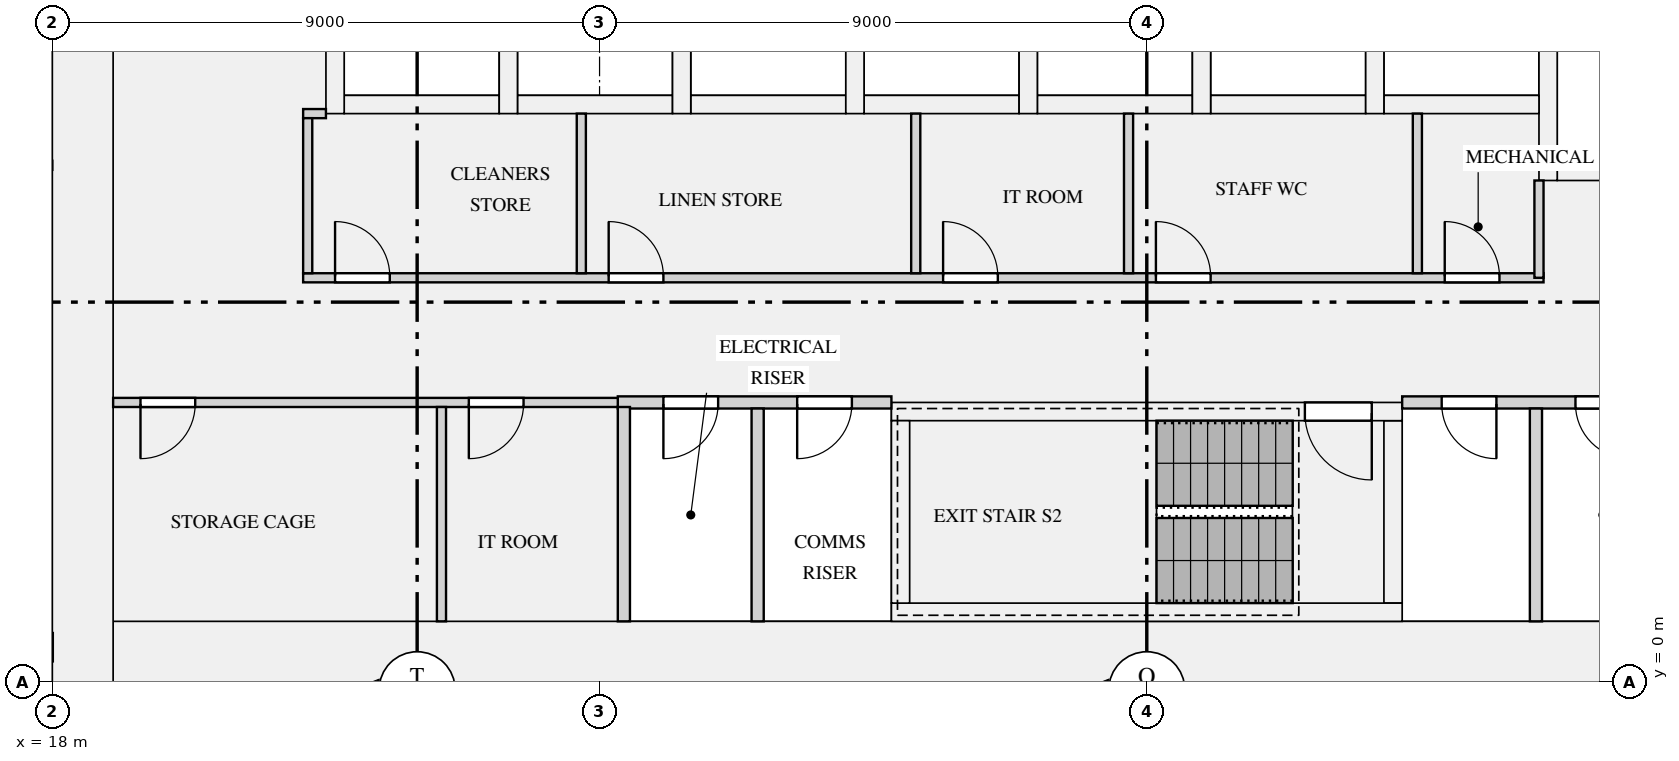
"""IFC4 building model, lengths in metres.
Left out: names, types, materials, properties, quantities, classifications, styles, units other than length and angle.
Written with IfcOpenShell. Run it as: python <this file> out.ifc"""

import sys

from ifc_helpers import new_model, si_unit, direction, frame, frame_2d, origin, place, context, subcontext, project, spatial, rectangle, extrude, element, fill, save


model = new_model("IFC4")
c1 = context("Model", 3, precision=1e-05, world=origin(), true_north=direction((0.0, 1.0)))
c2 = subcontext(c1, "Body", "Model", "MODEL_VIEW")
j1 = project(units=[si_unit("LENGTHUNIT", "METRE"), si_unit("PLANEANGLEUNIT", "RADIAN")], contexts=[c1])
p1 = place(None, origin())
s1 = spatial("IfcSite", under=j1, at=p1, CompositionType="ELEMENT")
p2 = place(p1, origin())
s2 = spatial("IfcBuilding", under=s1, at=p2, CompositionType="ELEMENT")
p3 = place(p2, frame((0.0, 0.0, 66.75)))
s3 = spatial("IfcBuildingStorey", under=s2, at=p3, CompositionType="ELEMENT", Elevation=66.75)
p4 = place(p3, frame((18.5, 0.0, 0.0), z_axis=(0.0, 0.0, 1.0), x_axis=(0.0, 1.0, 0.0)))
e1 = element("IfcWall", 1, at=p4, inside=s3, PredefinedType="SHEAR", context=c2, shape_type="SweptSolid", body=[
    extrude(rectangle(XDim=12.5, YDim=1.0, at=frame_2d((6.25, 0.0))), origin(), (0.0, 0.0, 1.0), 3.15),
])
p5 = place(p3, frame((19.0, 0.5, 0.0), z_axis=(0.0, 0.0, 1.0), x_axis=(1.0, 0.0, 0.0)))
e2 = element("IfcWall", 2, at=p5, inside=s3, PredefinedType="SHEAR", context=c2, shape_type="SweptSolid", body=[
    extrude(rectangle(XDim=34.0, YDim=1.0, at=frame_2d((17.0, 0.0))), origin(), (0.0, 0.0, 1.0), 3.15),
])
p6 = place(p3, frame((22.8, 9.5, 0.0), z_axis=(0.0, 0.0, 1.0), x_axis=(1.0, 0.0, 0.0)))
e3 = element("IfcWall", 3, at=p6, inside=s3, PredefinedType="SHEAR", context=c2, shape_type="SweptSolid", body=[
    extrude(rectangle(XDim=2.55, YDim=0.3, at=frame_2d((1.275, 0.0))), origin(), (0.0, 0.0, 1.0), 3.15),
])
p7 = place(p3, frame((22.65, 9.35, 0.0), z_axis=(0.0, 0.0, 1.0), x_axis=(0.0, 1.0, 0.0)))
e4 = element("IfcWall", 4, at=p7, inside=s3, PredefinedType="SHEAR", context=c2, shape_type="SweptSolid", body=[
    extrude(rectangle(XDim=2.55, YDim=0.3, at=frame_2d((1.275, 0.0))), origin(), (0.0, 0.0, 1.0), 3.15),
])
p8 = place(p3, frame((25.65, 9.5, 0.0), z_axis=(0.0, 0.0, 1.0), x_axis=(1.0, 0.0, 0.0)))
e5 = element("IfcWall", 5, at=p8, inside=s3, PredefinedType="SHEAR", context=c2, shape_type="SweptSolid", body=[
    extrude(rectangle(XDim=2.55, YDim=0.3, at=frame_2d((1.275, 0.0))), origin(), (0.0, 0.0, 1.0), 3.15),
])
p9 = place(p3, frame((25.5, 9.35, 0.0), z_axis=(0.0, 0.0, 1.0), x_axis=(0.0, 1.0, 0.0)))
e6 = element("IfcWall", 6, at=p9, inside=s3, PredefinedType="SHEAR", context=c2, shape_type="SweptSolid", body=[
    extrude(rectangle(XDim=2.55, YDim=0.3, at=frame_2d((1.275, 0.0))), origin(), (0.0, 0.0, 1.0), 3.15),
])
p10 = place(p3, frame((28.5, 9.5, 0.0), z_axis=(0.0, 0.0, 1.0), x_axis=(1.0, 0.0, 0.0)))
e7 = element("IfcWall", 7, at=p10, inside=s3, PredefinedType="SHEAR", context=c2, shape_type="SweptSolid", body=[
    extrude(rectangle(XDim=2.55, YDim=0.3, at=frame_2d((1.275, 0.0))), origin(), (0.0, 0.0, 1.0), 3.15),
])
for number, where, z_axis, x_axis in (
    (8, (28.35, 9.35, 0.0), (0.0, 0.0, 1.0), (0.0, 1.0, 0.0)),
    (9, (31.35, 9.5, 0.0), (0.0, 0.0, 1.0), (1.0, 0.0, 0.0)),
    (10, (31.2, 9.35, 0.0), (0.0, 0.0, 1.0), (0.0, 1.0, 0.0)),
):
    element("IfcWall", number, at=place(p3, frame(where, z_axis=z_axis, x_axis=x_axis)), inside=s3, PredefinedType="SHEAR", context=c2, shape_type="SweptSolid", body=[
        extrude(rectangle(XDim=2.55, YDim=0.3, at=frame_2d((1.275, 0.0))), origin(), (0.0, 0.0, 1.0), 3.15),
    ])
p11 = place(p3, frame((34.2, 9.5, 0.0), z_axis=(0.0, 0.0, 1.0), x_axis=(1.0, 0.0, 0.0)))
e11 = element("IfcWall", 11, at=p11, inside=s3, PredefinedType="SHEAR", context=c2, shape_type="SweptSolid", body=[
    extrude(rectangle(XDim=2.55, YDim=0.3, at=frame_2d((1.275, 0.0))), origin(), (0.0, 0.0, 1.0), 3.15),
])
p12 = place(p3, frame((34.05, 9.35, 0.0), z_axis=(0.0, 0.0, 1.0), x_axis=(0.0, 1.0, 0.0)))
e12 = element("IfcWall", 12, at=p12, inside=s3, PredefinedType="SHEAR", context=c2, shape_type="SweptSolid", body=[
    extrude(rectangle(XDim=2.55, YDim=0.3, at=frame_2d((1.275, 0.0))), origin(), (0.0, 0.0, 1.0), 3.15),
])
p13 = place(p3, frame((37.05, 9.5, 0.0), z_axis=(0.0, 0.0, 1.0), x_axis=(1.0, 0.0, 0.0)))
e13 = element("IfcWall", 13, at=p13, inside=s3, PredefinedType="SHEAR", context=c2, shape_type="SweptSolid", body=[
    extrude(rectangle(XDim=2.55, YDim=0.3, at=frame_2d((1.275, 0.0))), origin(), (0.0, 0.0, 1.0), 3.15),
])
p14 = place(p3, frame((36.9, 9.35, 0.0), z_axis=(0.0, 0.0, 1.0), x_axis=(0.0, 1.0, 0.0)))
e14 = element("IfcWall", 14, at=p14, inside=s3, PredefinedType="SHEAR", context=c2, shape_type="SweptSolid", body=[
    extrude(rectangle(XDim=2.55, YDim=0.3, at=frame_2d((1.275, 0.0))), origin(), (0.0, 0.0, 1.0), 3.15),
])
p15 = place(p3, frame((39.9, 9.5, 0.0), z_axis=(0.0, 0.0, 1.0), x_axis=(1.0, 0.0, 0.0)))
e15 = element("IfcWall", 15, at=p15, inside=s3, PredefinedType="SHEAR", context=c2, shape_type="SweptSolid", body=[
    extrude(rectangle(XDim=2.55, YDim=0.3, at=frame_2d((1.275, 0.0))), origin(), (0.0, 0.0, 1.0), 3.15),
])
p16 = place(p3, frame((39.75, 9.35, 0.0), z_axis=(0.0, 0.0, 1.0), x_axis=(0.0, 1.0, 0.0)))
e16 = element("IfcWall", 16, at=p16, inside=s3, PredefinedType="SHEAR", context=c2, shape_type="SweptSolid", body=[
    extrude(rectangle(XDim=2.55, YDim=0.3, at=frame_2d((1.275, 0.0))), origin(), (0.0, 0.0, 1.0), 3.15),
])
p17 = place(p3, frame((42.75, 8.4, 0.0), z_axis=(0.0, 0.0, 1.0), x_axis=(1.0, 0.0, 0.0)))
e17 = element("IfcWall", 17, at=p17, inside=s3, PredefinedType="SHEAR", context=c2, shape_type="SweptSolid", body=[
    extrude(rectangle(XDim=1.95, YDim=0.3, at=frame_2d((0.975, 0.0))), origin(), (0.0, 0.0, 1.0), 3.15),
])
p18 = place(p3, frame((42.6, 8.25, 0.0), z_axis=(0.0, 0.0, 1.0), x_axis=(0.0, 1.0, 0.0)))
e18 = element("IfcWall", 18, at=p18, inside=s3, PredefinedType="SHEAR", context=c2, shape_type="SweptSolid", body=[
    extrude(rectangle(XDim=3.65, YDim=0.3, at=frame_2d((1.825, 0.0))), origin(), (0.0, 0.0, 1.0), 3.15),
])
p19 = place(p3, frame((31.8, 1.15, 0.0), z_axis=(0.0, 0.0, 1.0), x_axis=(1.0, 0.0, 0.0)))
e19 = element("IfcWall", 19, at=p19, inside=s3, PredefinedType="SHEAR", context=c2, shape_type="SweptSolid", body=[
    extrude(rectangle(XDim=8.4, YDim=0.3, at=frame_2d((4.2, 0.0))), origin(), (0.0, 0.0, 1.0), 3.15),
])
p20 = place(p3, frame((31.8, 4.45, 0.0), z_axis=(0.0, 0.0, 1.0), x_axis=(1.0, 0.0, 0.0)))
e20 = element("IfcWall", 20, at=p20, inside=s3, PredefinedType="SHEAR", context=c2, shape_type="SweptSolid", body=[
    extrude(rectangle(XDim=8.4, YDim=0.3, at=frame_2d((4.2, 0.0))), origin(), (0.0, 0.0, 1.0), 3.15),
])
p21 = place(p20, frame((6.8, 0.0, 0.0)))
e21 = element("IfcOpeningElement", 21, at=p21, cuts=e20, PredefinedType="OPENING", context=c2, shape_type="SweptSolid", body=[
    extrude(rectangle(XDim=1.1, YDim=2.1, at=frame_2d((0.55, 1.05))), frame((0.0, 0.16, 0.0), z_axis=(0.0, -1.0, 0.0), x_axis=(1.0, 0.0, 0.0)), (0.0, 0.0, 1.0), 0.32),
])
for number, where, z_axis, x_axis in (
    (22, (31.95, 1.3, 0.0), (0.0, 0.0, 1.0), (0.0, 1.0, 0.0)),
    (23, (40.05, 1.3, 0.0), (0.0, 0.0, 1.0), (0.0, 1.0, 0.0)),
):
    element("IfcWall", number, at=place(p3, frame(where, z_axis=z_axis, x_axis=x_axis)), inside=s3, PredefinedType="SHEAR", context=c2, shape_type="SweptSolid", body=[
        extrude(rectangle(XDim=3.0, YDim=0.3, at=frame_2d((1.5, 0.0))), origin(), (0.0, 0.0, 1.0), 3.15),
    ])
p22 = place(p3, frame((27.3, 4.6, 0.0), z_axis=(0.0, 0.0, 1.0), x_axis=(1.0, 0.0, 0.0)))
e24 = element("IfcWall", 24, at=p22, inside=s3, PredefinedType="PARTITIONING", context=c2, shape_type="SweptSolid", body=[
    extrude(rectangle(XDim=4.5, YDim=0.2, at=frame_2d((2.25, 0.0))), origin(), (0.0, 0.0, 1.0), 2.83),
])
p23 = place(p22, frame((0.75, 0.0, 0.0)))
e25 = element("IfcOpeningElement", 25, at=p23, cuts=e24, PredefinedType="OPENING", context=c2, shape_type="SweptSolid", body=[
    extrude(rectangle(XDim=0.9, YDim=2.1, at=frame_2d((0.45, 1.05))), frame((0.0, 0.11, 0.0), z_axis=(0.0, -1.0, 0.0), x_axis=(1.0, 0.0, 0.0)), (0.0, 0.0, 1.0), 0.22),
])
p24 = place(p22, frame((2.95, 0.0, 0.0)))
e26 = element("IfcOpeningElement", 26, at=p24, cuts=e24, PredefinedType="OPENING", context=c2, shape_type="SweptSolid", body=[
    extrude(rectangle(XDim=0.9, YDim=2.1, at=frame_2d((0.45, 1.05))), frame((0.0, 0.11, 0.0), z_axis=(0.0, -1.0, 0.0), x_axis=(1.0, 0.0, 0.0)), (0.0, 0.0, 1.0), 0.22),
])
p25 = place(p3, frame((40.2, 4.6, 0.0), z_axis=(0.0, 0.0, 1.0), x_axis=(1.0, 0.0, 0.0)))
e27 = element("IfcWall", 27, at=p25, inside=s3, PredefinedType="PARTITIONING", context=c2, shape_type="SweptSolid", body=[
    extrude(rectangle(XDim=4.5, YDim=0.2, at=frame_2d((2.25, 0.0))), origin(), (0.0, 0.0, 1.0), 2.83),
])
p26 = place(p25, frame((0.65, 0.0, 0.0)))
e28 = element("IfcOpeningElement", 28, at=p26, cuts=e27, PredefinedType="OPENING", context=c2, shape_type="SweptSolid", body=[
    extrude(rectangle(XDim=0.9, YDim=2.1, at=frame_2d((0.45, 1.05))), frame((0.0, 0.11, 0.0), z_axis=(0.0, -1.0, 0.0), x_axis=(1.0, 0.0, 0.0)), (0.0, 0.0, 1.0), 0.22),
])
p27 = place(p25, frame((2.85, 0.0, 0.0)))
e29 = element("IfcOpeningElement", 29, at=p27, cuts=e27, PredefinedType="OPENING", context=c2, shape_type="SweptSolid", body=[
    extrude(rectangle(XDim=0.9, YDim=2.1, at=frame_2d((0.45, 1.05))), frame((0.0, 0.11, 0.0), z_axis=(0.0, -1.0, 0.0), x_axis=(1.0, 0.0, 0.0)), (0.0, 0.0, 1.0), 0.22),
])
p28 = place(p3, frame((19.0, 4.6, 0.0), z_axis=(0.0, 0.0, 1.0), x_axis=(1.0, 0.0, 0.0)))
e30 = element("IfcWall", 30, at=p28, inside=s3, PredefinedType="PARTITIONING", context=c2, shape_type="SweptSolid", body=[
    extrude(rectangle(XDim=8.3, YDim=0.15, at=frame_2d((4.15, 0.0))), origin(), (0.0, 0.0, 1.0), 2.83),
])
p29 = place(p28, frame((0.45, 0.0, 0.0)))
e31 = element("IfcOpeningElement", 31, at=p29, cuts=e30, PredefinedType="OPENING", context=c2, shape_type="SweptSolid", body=[
    extrude(rectangle(XDim=0.9, YDim=2.1, at=frame_2d((0.45, 1.05))), frame((0.0, 0.085, 0.0), z_axis=(0.0, -1.0, 0.0), x_axis=(1.0, 0.0, 0.0)), (0.0, 0.0, 1.0), 0.17),
])
p30 = place(p28, frame((5.85, 0.0, 0.0)))
e32 = element("IfcOpeningElement", 32, at=p30, cuts=e30, PredefinedType="OPENING", context=c2, shape_type="SweptSolid", body=[
    extrude(rectangle(XDim=0.9, YDim=2.1, at=frame_2d((0.45, 1.05))), frame((0.0, 0.085, 0.0), z_axis=(0.0, -1.0, 0.0), x_axis=(1.0, 0.0, 0.0)), (0.0, 0.0, 1.0), 0.17),
])
p31 = place(p3, frame((22.125, 6.65, 0.0), z_axis=(0.0, 0.0, 1.0), x_axis=(1.0, 0.0, 0.0)))
e33 = element("IfcWall", 33, at=p31, inside=s3, PredefinedType="PARTITIONING", context=c2, shape_type="SweptSolid", body=[
    extrude(rectangle(XDim=20.4, YDim=0.15, at=frame_2d((10.2, 0.0))), origin(), (0.0, 0.0, 1.0), 2.83),
])
p32 = place(p31, frame((0.525, 0.0, 0.0)))
e34 = element("IfcOpeningElement", 34, at=p32, cuts=e33, PredefinedType="OPENING", context=c2, shape_type="SweptSolid", body=[
    extrude(rectangle(XDim=0.9, YDim=2.1, at=frame_2d((0.45, 1.05))), frame((0.0, 0.085, 0.0), z_axis=(0.0, -1.0, 0.0), x_axis=(1.0, 0.0, 0.0)), (0.0, 0.0, 1.0), 0.17),
])
p33 = place(p31, frame((5.025, 0.0, 0.0)))
e35 = element("IfcOpeningElement", 35, at=p33, cuts=e33, PredefinedType="OPENING", context=c2, shape_type="SweptSolid", body=[
    extrude(rectangle(XDim=0.9, YDim=2.1, at=frame_2d((0.45, 1.05))), frame((0.0, 0.085, 0.0), z_axis=(0.0, -1.0, 0.0), x_axis=(1.0, 0.0, 0.0)), (0.0, 0.0, 1.0), 0.17),
])
p34 = place(p31, frame((10.525, 0.0, 0.0)))
e36 = element("IfcOpeningElement", 36, at=p34, cuts=e33, PredefinedType="OPENING", context=c2, shape_type="SweptSolid", body=[
    extrude(rectangle(XDim=0.9, YDim=2.1, at=frame_2d((0.45, 1.05))), frame((0.0, 0.085, 0.0), z_axis=(0.0, -1.0, 0.0), x_axis=(1.0, 0.0, 0.0)), (0.0, 0.0, 1.0), 0.17),
])
p35 = place(p31, frame((14.025, 0.0, 0.0)))
e37 = element("IfcOpeningElement", 37, at=p35, cuts=e33, PredefinedType="OPENING", context=c2, shape_type="SweptSolid", body=[
    extrude(rectangle(XDim=0.9, YDim=2.1, at=frame_2d((0.45, 1.05))), frame((0.0, 0.085, 0.0), z_axis=(0.0, -1.0, 0.0), x_axis=(1.0, 0.0, 0.0)), (0.0, 0.0, 1.0), 0.17),
])
p36 = place(p31, frame((18.775, 0.0, 0.0)))
e38 = element("IfcOpeningElement", 38, at=p36, cuts=e33, PredefinedType="OPENING", context=c2, shape_type="SweptSolid", body=[
    extrude(rectangle(XDim=0.9, YDim=2.1, at=frame_2d((0.45, 1.05))), frame((0.0, 0.085, 0.0), z_axis=(0.0, -1.0, 0.0), x_axis=(1.0, 0.0, 0.0)), (0.0, 0.0, 1.0), 0.17),
])
p37 = place(p3, frame((22.125, 9.35, 0.0), z_axis=(0.0, 0.0, 1.0), x_axis=(1.0, 0.0, 0.0)))
e39 = element("IfcWall", 39, at=p37, inside=s3, PredefinedType="PARTITIONING", context=c2, shape_type="SweptSolid", body=[
    extrude(rectangle(XDim=0.375, YDim=0.15, at=frame_2d((0.188, 0.0))), origin(), (0.0, 0.0, 1.0), 2.83),
])
p38 = place(p3, frame((24.4, 1.0, 0.0), z_axis=(0.0, 0.0, 1.0), x_axis=(0.0, 1.0, 0.0)))
e40 = element("IfcWall", 40, at=p38, inside=s3, PredefinedType="PARTITIONING", context=c2, shape_type="SweptSolid", body=[
    extrude(rectangle(XDim=3.525, YDim=0.15, at=frame_2d((1.762, 0.0))), origin(), (0.0, 0.0, 1.0), 2.83),
])
p39 = place(p3, frame((27.4, 1.0, 0.0), z_axis=(0.0, 0.0, 1.0), x_axis=(0.0, 1.0, 0.0)))
e41 = element("IfcWall", 41, at=p39, inside=s3, PredefinedType="PARTITIONING", context=c2, shape_type="SweptSolid", body=[
    extrude(rectangle(XDim=3.525, YDim=0.2, at=frame_2d((1.762, 0.0))), origin(), (0.0, 0.0, 1.0), 2.83),
])
for number, where, z_axis, x_axis in (
    (42, (29.6, 1.0, 0.0), (0.0, 0.0, 1.0), (0.0, 1.0, 0.0)),
    (43, (42.4, 1.0, 0.0), (0.0, 0.0, 1.0), (0.0, 1.0, 0.0)),
):
    element("IfcWall", number, at=place(p3, frame(where, z_axis=z_axis, x_axis=x_axis)), inside=s3, PredefinedType="PARTITIONING", context=c2, shape_type="SweptSolid", body=[
        extrude(rectangle(XDim=3.5, YDim=0.2, at=frame_2d((1.75, 0.0))), origin(), (0.0, 0.0, 1.0), 2.83),
    ])
p40 = place(p3, frame((42.45, 6.65, 0.0), z_axis=(0.0, 0.0, 1.0), x_axis=(0.0, 1.0, 0.0)))
e44 = element("IfcWall", 44, at=p40, inside=s3, PredefinedType="PARTITIONING", context=c2, shape_type="SweptSolid", body=[
    extrude(rectangle(XDim=1.6, YDim=0.15, at=frame_2d((0.8, 0.0))), origin(), (0.0, 0.0, 1.0), 2.83),
])
p41 = place(p3, frame((22.2, 6.725, 0.0), z_axis=(0.0, 0.0, 1.0), x_axis=(0.0, 1.0, 0.0)))
e45 = element("IfcWall", 45, at=p41, inside=s3, PredefinedType="PARTITIONING", context=c2, shape_type="SweptSolid", body=[
    extrude(rectangle(XDim=2.55, YDim=0.15, at=frame_2d((1.275, 0.0))), origin(), (0.0, 0.0, 1.0), 2.83),
])
for number, where, z_axis, x_axis in (
    (46, (26.7, 6.725, 0.0), (0.0, 0.0, 1.0), (0.0, 1.0, 0.0)),
    (47, (32.2, 6.725, 0.0), (0.0, 0.0, 1.0), (0.0, 1.0, 0.0)),
    (48, (35.7, 6.725, 0.0), (0.0, 0.0, 1.0), (0.0, 1.0, 0.0)),
    (49, (40.45, 6.725, 0.0), (0.0, 0.0, 1.0), (0.0, 1.0, 0.0)),
):
    element("IfcWall", number, at=place(p3, frame(where, z_axis=z_axis, x_axis=x_axis)), inside=s3, PredefinedType="PARTITIONING", context=c2, shape_type="SweptSolid", body=[
        extrude(rectangle(XDim=2.625, YDim=0.15, at=frame_2d((1.312, 0.0))), origin(), (0.0, 0.0, 1.0), 2.83),
    ])
p42 = place(p21, frame((1.1, 0.0, 0.0), z_axis=(0.0, 0.0, 1.0), x_axis=(-1.0, 0.0, 0.0)))
e50 = element("IfcDoor", 50, at=p42, inside=s3, OperationType="SINGLE_SWING_LEFT", PredefinedType="DOOR", context=c2, shape_type="SweptSolid", body=[
    extrude(rectangle(XDim=1.1, YDim=2.1, at=frame_2d((0.55, 1.05))), frame((0.0, 0.025, 0.0), z_axis=(0.0, -1.0, 0.0), x_axis=(1.0, 0.0, 0.0)), (0.0, 0.0, 1.0), 0.05),
])
fill(e21, e50)
p43 = place(p32, origin())
e51 = element("IfcDoor", 51, at=p43, inside=s3, OperationType="SINGLE_SWING_LEFT", PredefinedType="DOOR", context=c2, shape_type="SweptSolid", body=[
    extrude(rectangle(XDim=0.9, YDim=2.1, at=frame_2d((0.45, 1.05))), frame((0.0, 0.025, 0.0), z_axis=(0.0, -1.0, 0.0), x_axis=(1.0, 0.0, 0.0)), (0.0, 0.0, 1.0), 0.05),
])
fill(e34, e51)
p44 = place(p33, origin())
e52 = element("IfcDoor", 52, at=p44, inside=s3, OperationType="SINGLE_SWING_LEFT", PredefinedType="DOOR", context=c2, shape_type="SweptSolid", body=[
    extrude(rectangle(XDim=0.9, YDim=2.1, at=frame_2d((0.45, 1.05))), frame((0.0, 0.025, 0.0), z_axis=(0.0, -1.0, 0.0), x_axis=(1.0, 0.0, 0.0)), (0.0, 0.0, 1.0), 0.05),
])
fill(e35, e52)
p45 = place(p34, origin())
e53 = element("IfcDoor", 53, at=p45, inside=s3, OperationType="SINGLE_SWING_LEFT", PredefinedType="DOOR", context=c2, shape_type="SweptSolid", body=[
    extrude(rectangle(XDim=0.9, YDim=2.1, at=frame_2d((0.45, 1.05))), frame((0.0, 0.025, 0.0), z_axis=(0.0, -1.0, 0.0), x_axis=(1.0, 0.0, 0.0)), (0.0, 0.0, 1.0), 0.05),
])
fill(e36, e53)
p46 = place(p35, origin())
e54 = element("IfcDoor", 54, at=p46, inside=s3, OperationType="SINGLE_SWING_LEFT", PredefinedType="DOOR", context=c2, shape_type="SweptSolid", body=[
    extrude(rectangle(XDim=0.9, YDim=2.1, at=frame_2d((0.45, 1.05))), frame((0.0, 0.025, 0.0), z_axis=(0.0, -1.0, 0.0), x_axis=(1.0, 0.0, 0.0)), (0.0, 0.0, 1.0), 0.05),
])
fill(e37, e54)
p47 = place(p36, origin())
e55 = element("IfcDoor", 55, at=p47, inside=s3, OperationType="SINGLE_SWING_LEFT", PredefinedType="DOOR", context=c2, shape_type="SweptSolid", body=[
    extrude(rectangle(XDim=0.9, YDim=2.1, at=frame_2d((0.45, 1.05))), frame((0.0, 0.025, 0.0), z_axis=(0.0, -1.0, 0.0), x_axis=(1.0, 0.0, 0.0)), (0.0, 0.0, 1.0), 0.05),
])
fill(e38, e55)
p48 = place(p29, frame((0.9, 0.0, 0.0), z_axis=(0.0, 0.0, 1.0), x_axis=(-1.0, 0.0, 0.0)))
e56 = element("IfcDoor", 56, at=p48, inside=s3, OperationType="SINGLE_SWING_RIGHT", PredefinedType="DOOR", context=c2, shape_type="SweptSolid", body=[
    extrude(rectangle(XDim=0.9, YDim=2.1, at=frame_2d((0.45, 1.05))), frame((0.0, 0.025, 0.0), z_axis=(0.0, -1.0, 0.0), x_axis=(1.0, 0.0, 0.0)), (0.0, 0.0, 1.0), 0.05),
])
fill(e31, e56)
p49 = place(p30, frame((0.9, 0.0, 0.0), z_axis=(0.0, 0.0, 1.0), x_axis=(-1.0, 0.0, 0.0)))
e57 = element("IfcDoor", 57, at=p49, inside=s3, OperationType="SINGLE_SWING_RIGHT", PredefinedType="DOOR", context=c2, shape_type="SweptSolid", body=[
    extrude(rectangle(XDim=0.9, YDim=2.1, at=frame_2d((0.45, 1.05))), frame((0.0, 0.025, 0.0), z_axis=(0.0, -1.0, 0.0), x_axis=(1.0, 0.0, 0.0)), (0.0, 0.0, 1.0), 0.05),
])
fill(e32, e57)
p50 = place(p23, frame((0.9, 0.0, 0.0), z_axis=(0.0, 0.0, 1.0), x_axis=(-1.0, 0.0, 0.0)))
e58 = element("IfcDoor", 58, at=p50, inside=s3, OperationType="SINGLE_SWING_RIGHT", PredefinedType="DOOR", context=c2, shape_type="SweptSolid", body=[
    extrude(rectangle(XDim=0.9, YDim=2.1, at=frame_2d((0.45, 1.05))), frame((0.0, 0.025, 0.0), z_axis=(0.0, -1.0, 0.0), x_axis=(1.0, 0.0, 0.0)), (0.0, 0.0, 1.0), 0.05),
])
fill(e25, e58)
p51 = place(p24, frame((0.9, 0.0, 0.0), z_axis=(0.0, 0.0, 1.0), x_axis=(-1.0, 0.0, 0.0)))
e59 = element("IfcDoor", 59, at=p51, inside=s3, OperationType="SINGLE_SWING_RIGHT", PredefinedType="DOOR", context=c2, shape_type="SweptSolid", body=[
    extrude(rectangle(XDim=0.9, YDim=2.1, at=frame_2d((0.45, 1.05))), frame((0.0, 0.025, 0.0), z_axis=(0.0, -1.0, 0.0), x_axis=(1.0, 0.0, 0.0)), (0.0, 0.0, 1.0), 0.05),
])
fill(e26, e59)
p52 = place(p26, frame((0.9, 0.0, 0.0), z_axis=(0.0, 0.0, 1.0), x_axis=(-1.0, 0.0, 0.0)))
e60 = element("IfcDoor", 60, at=p52, inside=s3, OperationType="SINGLE_SWING_LEFT", PredefinedType="DOOR", context=c2, shape_type="SweptSolid", body=[
    extrude(rectangle(XDim=0.9, YDim=2.1, at=frame_2d((0.45, 1.05))), frame((0.0, 0.025, 0.0), z_axis=(0.0, -1.0, 0.0), x_axis=(1.0, 0.0, 0.0)), (0.0, 0.0, 1.0), 0.05),
])
fill(e28, e60)
p53 = place(p27, frame((0.9, 0.0, 0.0), z_axis=(0.0, 0.0, 1.0), x_axis=(-1.0, 0.0, 0.0)))
e61 = element("IfcDoor", 61, at=p53, inside=s3, OperationType="SINGLE_SWING_LEFT", PredefinedType="DOOR", context=c2, shape_type="SweptSolid", body=[
    extrude(rectangle(XDim=0.9, YDim=2.1, at=frame_2d((0.45, 1.05))), frame((0.0, 0.025, 0.0), z_axis=(0.0, -1.0, 0.0), x_axis=(1.0, 0.0, 0.0)), (0.0, 0.0, 1.0), 0.05),
])
fill(e29, e61)
save(model, sys.argv[1])
